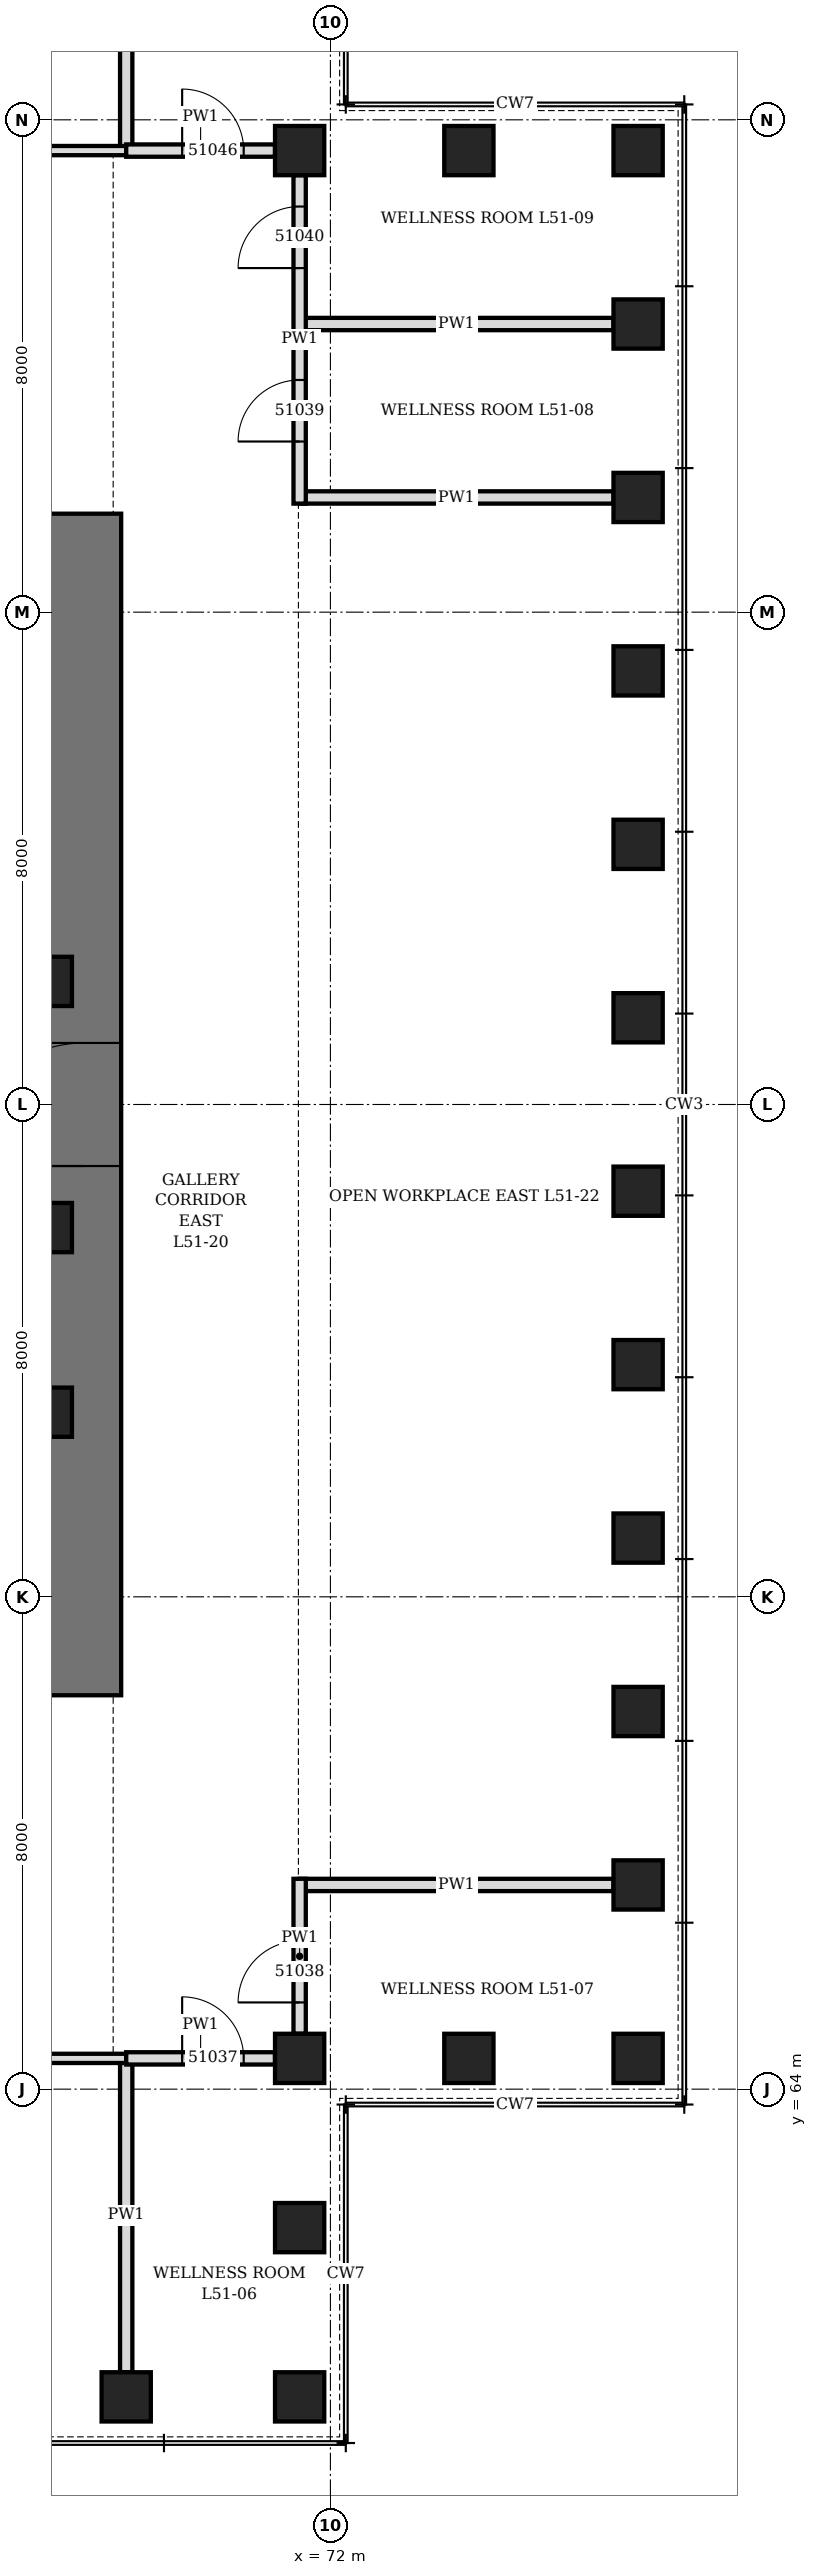
"""IFC4 building model, lengths in metres.
Left out: names, types, materials, properties, quantities, classifications, styles, units other than length and angle.
Written with IfcOpenShell. Run it as: python <this file> out.ifc"""

import sys

from ifc_helpers import new_model, si_unit, direction, frame, frame_2d, origin, origin_2d, place, context, subcontext, project, spatial, rectangle, hollow_rectangle, extrude, element, fill, save


model = new_model("IFC4")
c1 = context("Model", 3, precision=1e-05, world=origin(), true_north=direction((0.0, 1.0)))
c2 = subcontext(c1, "Body", "Model", "MODEL_VIEW")
j1 = project(units=[si_unit("LENGTHUNIT", "METRE"), si_unit("PLANEANGLEUNIT", "RADIAN")], contexts=[c1])
p1 = place(None, origin())
s1 = spatial("IfcSite", under=j1, at=p1, CompositionType="ELEMENT")
p2 = place(p1, origin())
s2 = spatial("IfcBuilding", under=s1, at=p2, CompositionType="ELEMENT")
p3 = place(p2, frame((0.0, 0.0, 227.5)))
s3 = spatial("IfcBuildingStorey", under=s2, at=p3, CompositionType="ELEMENT", Elevation=227.5)
for number, where, z_axis, x_axis in (
    (1, (68.682, 59.0, 0.0), (0.0, 0.0, 1.0), (1.0, 0.0, 0.0)),
    (2, (71.5, 59.0, 0.0), (0.0, 0.0, 1.0), (0.0, 1.0, 0.0)),
    (3, (71.5, 61.75, 0.0), (0.0, 0.0, 1.0), (0.0, 1.0, 0.0)),
    (4, (71.5, 64.5, 0.0), (0.0, 0.0, 1.0), (1.0, 0.0, 0.0)),
    (5, (74.25, 64.5, 0.0), (0.0, 0.0, 1.0), (1.0, 0.0, 0.0)),
    (6, (77.0, 64.5, 0.0), (0.0, 0.0, 1.0), (0.0, 1.0, 0.0)),
    (7, (77.0, 67.318, 0.0), (0.0, 0.0, 1.0), (0.0, 1.0, 0.0)),
    (8, (77.0, 70.136, 0.0), (0.0, 0.0, 1.0), (0.0, 1.0, 0.0)),
    (9, (77.0, 72.955, 0.0), (0.0, 0.0, 1.0), (0.0, 1.0, 0.0)),
    (10, (77.0, 75.773, 0.0), (0.0, 0.0, 1.0), (0.0, 1.0, 0.0)),
    (11, (77.0, 78.591, 0.0), (0.0, 0.0, 1.0), (0.0, 1.0, 0.0)),
    (12, (77.0, 81.409, 0.0), (0.0, 0.0, 1.0), (0.0, 1.0, 0.0)),
    (13, (77.0, 84.227, 0.0), (0.0, 0.0, 1.0), (0.0, 1.0, 0.0)),
    (14, (77.0, 87.045, 0.0), (0.0, 0.0, 1.0), (0.0, 1.0, 0.0)),
    (15, (77.0, 89.864, 0.0), (0.0, 0.0, 1.0), (0.0, 1.0, 0.0)),
    (16, (77.0, 92.682, 0.0), (0.0, 0.0, 1.0), (0.0, 1.0, 0.0)),
    (17, (77.0, 95.5, 0.0), (0.0, 0.0, 1.0), (1.0, 0.0, 0.0)),
    (18, (74.25, 95.5, 0.0), (0.0, 0.0, 1.0), (1.0, 0.0, 0.0)),
    (19, (71.5, 95.5, 0.0), (0.0, 0.0, 1.0), (0.0, 1.0, 0.0)),
):
    element("IfcColumn", number, at=place(p3, frame(where, z_axis=z_axis, x_axis=x_axis)), inside=s3, PredefinedType="COLUMN", context=c2, shape_type="SweptSolid", body=[
        extrude(hollow_rectangle(XDim=0.8, YDim=0.8, WallThickness=0.08, at=origin_2d()), origin(), (0.0, 0.0, 1.0), 4.2),
    ])
p4 = place(p3, frame((68.0, 70.4, 0.0), z_axis=(0.0, 0.0, 1.0), x_axis=(0.0, 1.0, 0.0)))
e20 = element("IfcWall", 20, at=p4, inside=s3, PredefinedType="SHEAR", context=c2, shape_type="SweptSolid", body=[
    extrude(rectangle(XDim=19.2, YDim=1.2, at=frame_2d((9.6, 0.0))), origin(), (0.0, 0.0, 1.0), 4.2),
])
p5 = place(p4, frame((8.6, 0.0, 0.0)))
e21 = element("IfcOpeningElement", 21, at=p5, cuts=e20, PredefinedType="OPENING", context=c2, shape_type="SweptSolid", body=[
    extrude(rectangle(XDim=2.0, YDim=2.4, at=frame_2d((1.0, 1.2))), frame((0.0, 0.61, 0.0), z_axis=(0.0, -1.0, 0.0), x_axis=(1.0, 0.0, 0.0)), (0.0, 0.0, 1.0), 1.22),
])
for number, where, z_axis, x_axis in (
    (22, (67.4, 75.0, 0.0), (0.0, 0.0, 1.0), (1.0, 0.0, 0.0)),
    (23, (67.4, 78.0, 0.0), (0.0, 0.0, 1.0), (1.0, 0.0, 0.0)),
    (24, (67.4, 82.0, 0.0), (0.0, 0.0, 1.0), (1.0, 0.0, 0.0)),
):
    element("IfcColumn", number, at=place(p3, frame(where, z_axis=z_axis, x_axis=x_axis)), inside=s3, PredefinedType="COLUMN", context=c2, shape_type="SweptSolid", body=[
        extrude(hollow_rectangle(XDim=0.8, YDim=0.8, WallThickness=0.1, at=origin_2d()), origin(), (0.0, 0.0, 1.0), 4.2),
    ])
for number, where, z_axis, x_axis in (
    (25, (68.682, 59.4, 0.0), (0.0, 0.0, 1.0), (0.0, 1.0, 0.0)),
    (26, (71.5, 67.318, 0.0), (0.0, 0.0, 1.0), (1.0, 0.0, 0.0)),
    (27, (71.5, 89.864, 0.0), (0.0, 0.0, 1.0), (1.0, 0.0, 0.0)),
    (28, (71.5, 92.682, 0.0), (0.0, 0.0, 1.0), (1.0, 0.0, 0.0)),
    (29, (68.682, 95.5, 0.0), (0.0, 0.0, 1.0), (0.0, 1.0, 0.0)),
):
    element("IfcWall", number, at=place(p3, frame(where, z_axis=z_axis, x_axis=x_axis)), inside=s3, PredefinedType="PARTITIONING", context=c2, shape_type="SweptSolid", body=[
        extrude(rectangle(XDim=5.1, YDim=0.2, at=frame_2d((2.55, 0.0))), origin(), (0.0, 0.0, 1.0), 3.428),
    ])
p6 = place(p3, frame((40.9, 64.5, 0.0), z_axis=(0.0, 0.0, 1.0), x_axis=(1.0, 0.0, 0.0)))
e30 = element("IfcWall", 30, at=p6, inside=s3, PredefinedType="PARTITIONING", context=c2, shape_type="SweptSolid", body=[
    extrude(rectangle(XDim=27.782, YDim=0.15, at=frame_2d((13.891, 0.0))), origin(), (0.0, 0.0, 1.0), 4.04),
])
p7 = place(p6, frame((0.509, 0.0, 0.0)))
e31 = element("IfcOpeningElement", 31, at=p7, cuts=e30, PredefinedType="OPENING", context=c2, shape_type="SweptSolid", body=[
    extrude(rectangle(XDim=1.0, YDim=2.4, at=frame_2d((0.5, 1.2))), frame((0.0, 0.085, 0.0), z_axis=(0.0, -1.0, 0.0), x_axis=(1.0, 0.0, 0.0)), (0.0, 0.0, 1.0), 0.17),
])
p8 = place(p6, frame((6.146, 0.0, 0.0)))
e32 = element("IfcOpeningElement", 32, at=p8, cuts=e30, PredefinedType="OPENING", context=c2, shape_type="SweptSolid", body=[
    extrude(rectangle(XDim=1.0, YDim=2.1, at=frame_2d((0.5, 1.05))), frame((0.0, 0.085, 0.0), z_axis=(0.0, -1.0, 0.0), x_axis=(1.0, 0.0, 0.0)), (0.0, 0.0, 1.0), 0.17),
])
p9 = place(p6, frame((11.782, 0.0, 0.0)))
e33 = element("IfcOpeningElement", 33, at=p9, cuts=e30, PredefinedType="OPENING", context=c2, shape_type="SweptSolid", body=[
    extrude(rectangle(XDim=1.0, YDim=2.1, at=frame_2d((0.5, 1.05))), frame((0.0, 0.085, 0.0), z_axis=(0.0, -1.0, 0.0), x_axis=(1.0, 0.0, 0.0)), (0.0, 0.0, 1.0), 0.17),
])
p10 = place(p6, frame((17.418, 0.0, 0.0)))
e34 = element("IfcOpeningElement", 34, at=p10, cuts=e30, PredefinedType="OPENING", context=c2, shape_type="SweptSolid", body=[
    extrude(rectangle(XDim=1.0, YDim=2.1, at=frame_2d((0.5, 1.05))), frame((0.0, 0.085, 0.0), z_axis=(0.0, -1.0, 0.0), x_axis=(1.0, 0.0, 0.0)), (0.0, 0.0, 1.0), 0.17),
])
p11 = place(p6, frame((23.054, 0.0, 0.0)))
e35 = element("IfcOpeningElement", 35, at=p11, cuts=e30, PredefinedType="OPENING", context=c2, shape_type="SweptSolid", body=[
    extrude(rectangle(XDim=1.0, YDim=2.1, at=frame_2d((0.5, 1.05))), frame((0.0, 0.085, 0.0), z_axis=(0.0, -1.0, 0.0), x_axis=(1.0, 0.0, 0.0)), (0.0, 0.0, 1.0), 0.17),
])
p12 = place(p3, frame((68.682, 64.5, 0.0), z_axis=(0.0, 0.0, 1.0), x_axis=(1.0, 0.0, 0.0)))
e36 = element("IfcWall", 36, at=p12, inside=s3, PredefinedType="PARTITIONING", context=c2, shape_type="SweptSolid", body=[
    extrude(rectangle(XDim=2.418, YDim=0.2, at=frame_2d((1.209, 0.0))), origin(), (0.0, 0.0, 1.0), 4.04),
])
p13 = place(p12, frame((0.909, 0.0, 0.0)))
e37 = element("IfcOpeningElement", 37, at=p13, cuts=e36, PredefinedType="OPENING", context=c2, shape_type="SweptSolid", body=[
    extrude(rectangle(XDim=1.0, YDim=2.1, at=frame_2d((0.5, 1.05))), frame((0.0, 0.11, 0.0), z_axis=(0.0, -1.0, 0.0), x_axis=(1.0, 0.0, 0.0)), (0.0, 0.0, 1.0), 0.22),
])
p14 = place(p3, frame((40.9, 95.5, 0.0), z_axis=(0.0, 0.0, 1.0), x_axis=(1.0, 0.0, 0.0)))
e38 = element("IfcWall", 38, at=p14, inside=s3, PredefinedType="PARTITIONING", context=c2, shape_type="SweptSolid", body=[
    extrude(rectangle(XDim=27.782, YDim=0.15, at=frame_2d((13.891, 0.0))), origin(), (0.0, 0.0, 1.0), 4.04),
])
p15 = place(p14, frame((0.509, 0.0, 0.0)))
e39 = element("IfcOpeningElement", 39, at=p15, cuts=e38, PredefinedType="OPENING", context=c2, shape_type="SweptSolid", body=[
    extrude(rectangle(XDim=1.0, YDim=2.4, at=frame_2d((0.5, 1.2))), frame((0.0, 0.085, 0.0), z_axis=(0.0, -1.0, 0.0), x_axis=(1.0, 0.0, 0.0)), (0.0, 0.0, 1.0), 0.17),
])
p16 = place(p14, frame((6.146, 0.0, 0.0)))
e40 = element("IfcOpeningElement", 40, at=p16, cuts=e38, PredefinedType="OPENING", context=c2, shape_type="SweptSolid", body=[
    extrude(rectangle(XDim=1.0, YDim=2.1, at=frame_2d((0.5, 1.05))), frame((0.0, 0.085, 0.0), z_axis=(0.0, -1.0, 0.0), x_axis=(1.0, 0.0, 0.0)), (0.0, 0.0, 1.0), 0.17),
])
p17 = place(p14, frame((11.782, 0.0, 0.0)))
e41 = element("IfcOpeningElement", 41, at=p17, cuts=e38, PredefinedType="OPENING", context=c2, shape_type="SweptSolid", body=[
    extrude(rectangle(XDim=1.0, YDim=2.1, at=frame_2d((0.5, 1.05))), frame((0.0, 0.085, 0.0), z_axis=(0.0, -1.0, 0.0), x_axis=(1.0, 0.0, 0.0)), (0.0, 0.0, 1.0), 0.17),
])
p18 = place(p14, frame((17.418, 0.0, 0.0)))
e42 = element("IfcOpeningElement", 42, at=p18, cuts=e38, PredefinedType="OPENING", context=c2, shape_type="SweptSolid", body=[
    extrude(rectangle(XDim=1.0, YDim=2.1, at=frame_2d((0.5, 1.05))), frame((0.0, 0.085, 0.0), z_axis=(0.0, -1.0, 0.0), x_axis=(1.0, 0.0, 0.0)), (0.0, 0.0, 1.0), 0.17),
])
p19 = place(p14, frame((23.054, 0.0, 0.0)))
e43 = element("IfcOpeningElement", 43, at=p19, cuts=e38, PredefinedType="OPENING", context=c2, shape_type="SweptSolid", body=[
    extrude(rectangle(XDim=1.0, YDim=2.1, at=frame_2d((0.5, 1.05))), frame((0.0, 0.085, 0.0), z_axis=(0.0, -1.0, 0.0), x_axis=(1.0, 0.0, 0.0)), (0.0, 0.0, 1.0), 0.17),
])
p20 = place(p3, frame((68.682, 95.5, 0.0), z_axis=(0.0, 0.0, 1.0), x_axis=(1.0, 0.0, 0.0)))
e44 = element("IfcWall", 44, at=p20, inside=s3, PredefinedType="PARTITIONING", context=c2, shape_type="SweptSolid", body=[
    extrude(rectangle(XDim=2.418, YDim=0.2, at=frame_2d((1.209, 0.0))), origin(), (0.0, 0.0, 1.0), 4.04),
])
p21 = place(p20, frame((0.909, 0.0, 0.0)))
e45 = element("IfcOpeningElement", 45, at=p21, cuts=e44, PredefinedType="OPENING", context=c2, shape_type="SweptSolid", body=[
    extrude(rectangle(XDim=1.0, YDim=2.1, at=frame_2d((0.5, 1.05))), frame((0.0, 0.11, 0.0), z_axis=(0.0, -1.0, 0.0), x_axis=(1.0, 0.0, 0.0)), (0.0, 0.0, 1.0), 0.22),
])
p22 = place(p3, frame((71.5, 64.9, 0.0), z_axis=(0.0, 0.0, 1.0), x_axis=(0.0, 1.0, 0.0)))
e46 = element("IfcWall", 46, at=p22, inside=s3, PredefinedType="PARTITIONING", context=c2, shape_type="SweptSolid", body=[
    extrude(rectangle(XDim=2.518, YDim=0.2, at=frame_2d((1.259, 0.0))), origin(), (0.0, 0.0, 1.0), 4.04),
])
p23 = place(p22, frame((0.509, 0.0, 0.0)))
e47 = element("IfcOpeningElement", 47, at=p23, cuts=e46, PredefinedType="OPENING", context=c2, shape_type="SweptSolid", body=[
    extrude(rectangle(XDim=1.0, YDim=2.1, at=frame_2d((0.5, 1.05))), frame((0.0, 0.11, 0.0), z_axis=(0.0, -1.0, 0.0), x_axis=(1.0, 0.0, 0.0)), (0.0, 0.0, 1.0), 0.22),
])
p24 = place(p3, frame((71.5, 89.764, 0.0), z_axis=(0.0, 0.0, 1.0), x_axis=(0.0, 1.0, 0.0)))
e48 = element("IfcWall", 48, at=p24, inside=s3, PredefinedType="PARTITIONING", context=c2, shape_type="SweptSolid", body=[
    extrude(rectangle(XDim=5.336, YDim=0.2, at=frame_2d((2.668, 0.0))), origin(), (0.0, 0.0, 1.0), 4.04),
])
p25 = place(p24, frame((1.009, 0.0, 0.0)))
e49 = element("IfcOpeningElement", 49, at=p25, cuts=e48, PredefinedType="OPENING", context=c2, shape_type="SweptSolid", body=[
    extrude(rectangle(XDim=1.0, YDim=2.1, at=frame_2d((0.5, 1.05))), frame((0.0, 0.11, 0.0), z_axis=(0.0, -1.0, 0.0), x_axis=(1.0, 0.0, 0.0)), (0.0, 0.0, 1.0), 0.22),
])
p26 = place(p24, frame((3.827, 0.0, 0.0)))
e50 = element("IfcOpeningElement", 50, at=p26, cuts=e48, PredefinedType="OPENING", context=c2, shape_type="SweptSolid", body=[
    extrude(rectangle(XDim=1.0, YDim=2.1, at=frame_2d((0.5, 1.05))), frame((0.0, 0.11, 0.0), z_axis=(0.0, -1.0, 0.0), x_axis=(1.0, 0.0, 0.0)), (0.0, 0.0, 1.0), 0.22),
])
p27 = place(p5, origin())
e51 = element("IfcDoor", 51, at=p27, inside=s3, OperationType="DOUBLE_DOOR_SINGLE_SWING", PredefinedType="DOOR", context=c2, shape_type="SweptSolid", body=[
    extrude(rectangle(XDim=2.0, YDim=2.4, at=frame_2d((1.0, 1.2))), frame((0.0, 0.35, 0.0), z_axis=(0.0, -1.0, 0.0), x_axis=(1.0, 0.0, 0.0)), (0.0, 0.0, 1.0), 0.7),
])
fill(e21, e51)
p28 = place(p13, origin())
e52 = element("IfcDoor", 52, at=p28, inside=s3, OperationType="SINGLE_SWING_LEFT", PredefinedType="DOOR", context=c2, shape_type="SweptSolid", body=[
    extrude(rectangle(XDim=1.0, YDim=2.1, at=frame_2d((0.5, 1.05))), frame((0.0, 0.1, 0.0), z_axis=(0.0, -1.0, 0.0), x_axis=(1.0, 0.0, 0.0)), (0.0, 0.0, 1.0), 0.199),
])
fill(e37, e52)
p29 = place(p23, origin())
e53 = element("IfcDoor", 53, at=p29, inside=s3, OperationType="SINGLE_SWING_LEFT", PredefinedType="DOOR", context=c2, shape_type="SweptSolid", body=[
    extrude(rectangle(XDim=1.0, YDim=2.1, at=frame_2d((0.5, 1.05))), frame((0.0, 0.1, 0.0), z_axis=(0.0, -1.0, 0.0), x_axis=(1.0, 0.0, 0.0)), (0.0, 0.0, 1.0), 0.199),
])
fill(e47, e53)
p30 = place(p25, origin())
e54 = element("IfcDoor", 54, at=p30, inside=s3, OperationType="SINGLE_SWING_LEFT", PredefinedType="DOOR", context=c2, shape_type="SweptSolid", body=[
    extrude(rectangle(XDim=1.0, YDim=2.1, at=frame_2d((0.5, 1.05))), frame((0.0, 0.1, 0.0), z_axis=(0.0, -1.0, 0.0), x_axis=(1.0, 0.0, 0.0)), (0.0, 0.0, 1.0), 0.199),
])
fill(e49, e54)
p31 = place(p26, origin())
e55 = element("IfcDoor", 55, at=p31, inside=s3, OperationType="SINGLE_SWING_LEFT", PredefinedType="DOOR", context=c2, shape_type="SweptSolid", body=[
    extrude(rectangle(XDim=1.0, YDim=2.1, at=frame_2d((0.5, 1.05))), frame((0.0, 0.1, 0.0), z_axis=(0.0, -1.0, 0.0), x_axis=(1.0, 0.0, 0.0)), (0.0, 0.0, 1.0), 0.199),
])
fill(e50, e55)
p32 = place(p21, origin())
e56 = element("IfcDoor", 56, at=p32, inside=s3, OperationType="SINGLE_SWING_LEFT", PredefinedType="DOOR", context=c2, shape_type="SweptSolid", body=[
    extrude(rectangle(XDim=1.0, YDim=2.1, at=frame_2d((0.5, 1.05))), frame((0.0, 0.1, 0.0), z_axis=(0.0, -1.0, 0.0), x_axis=(1.0, 0.0, 0.0)), (0.0, 0.0, 1.0), 0.199),
])
fill(e45, e56)
save(model, sys.argv[1])
